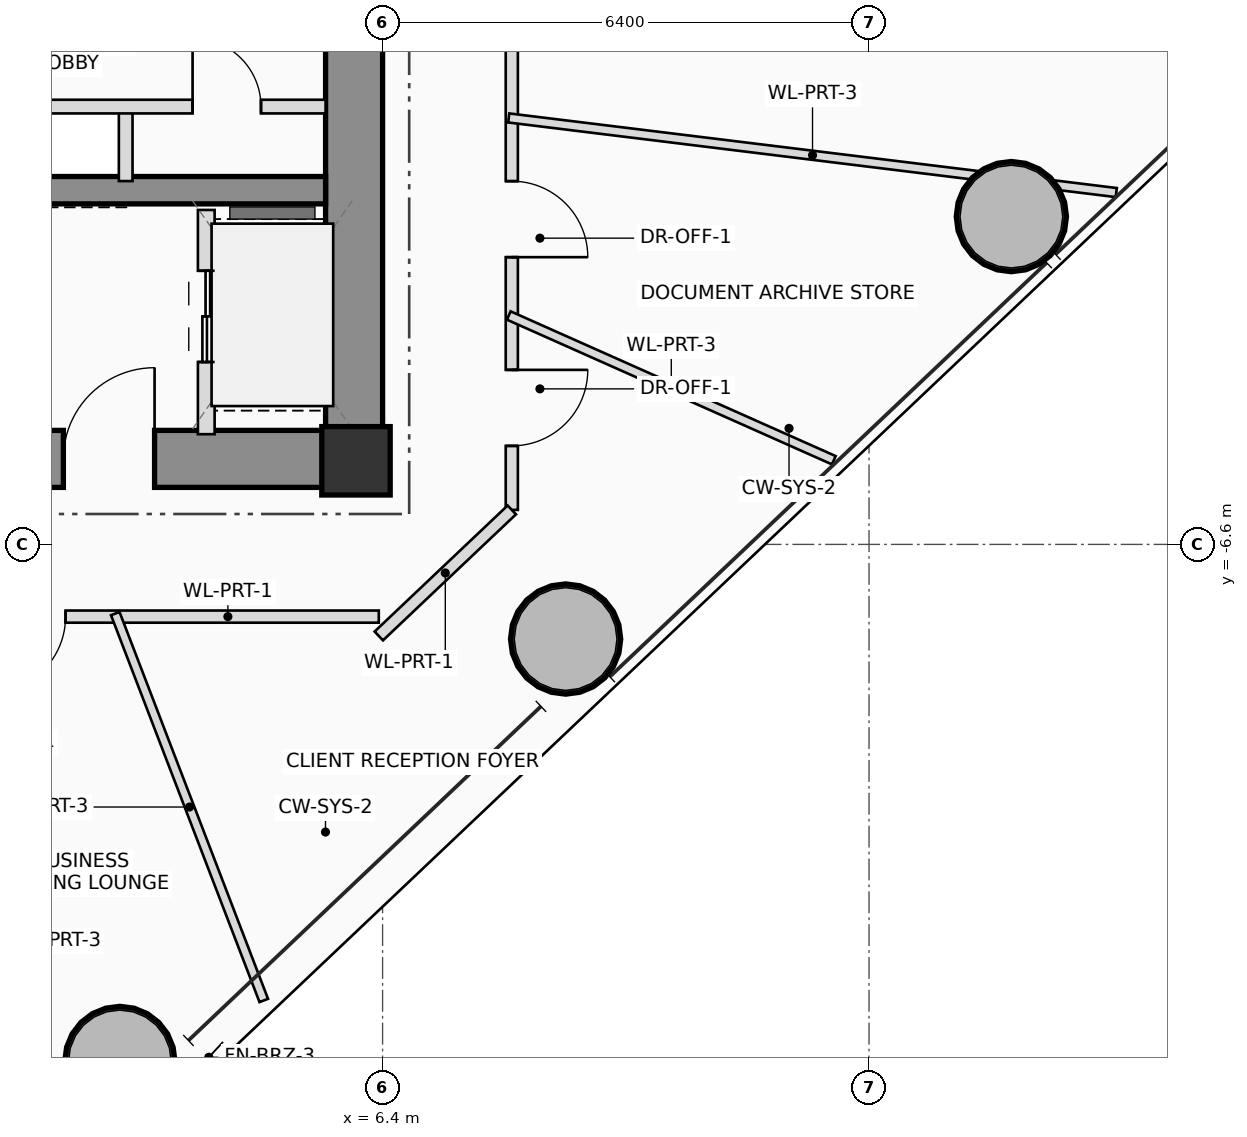
"""IFC4 building model, lengths in metres.
Left out: names, types, materials, properties, quantities, classifications, styles, units other than length and angle.
Written with IfcOpenShell. Run it as: python <this file> out.ifc"""

import sys

from ifc_helpers import new_model, si_unit, direction, frame, frame_2d, origin, origin_2d, place, context, subcontext, project, spatial, rectangle, hollow_circle, extrude, source, transform, mapped, element, fill, save


model = new_model("IFC4")
c1 = context("Model", 3, precision=1e-05, world=origin(), true_north=direction((0.0, 1.0)))
c2 = subcontext(c1, "Body", "Model", "MODEL_VIEW")
j1 = project(units=[si_unit("LENGTHUNIT", "METRE"), si_unit("PLANEANGLEUNIT", "RADIAN")], contexts=[c1])
p1 = place(None, origin())
s1 = spatial("IfcSite", under=j1, at=p1, CompositionType="ELEMENT")
p2 = place(p1, origin())
s2 = spatial("IfcBuilding", under=s1, at=p2, CompositionType="ELEMENT")
p3 = place(p2, frame((0.0, 0.0, 108.65)))
s3 = spatial("IfcBuildingStorey", under=s2, at=p3, CompositionType="ELEMENT", Elevation=108.65)
m1 = source(origin(), c2, "Body", "SweptSolid", [
    extrude(rectangle(XDim=0.9, YDim=0.9, at=origin_2d()), origin(), (0.0, 0.0, 1.0), 3.75),
])
p4 = place(p3, frame((6.05, -5.5, 0.0), z_axis=(0.0, 0.0, 1.0), x_axis=(1.0, 0.0, 0.0)))
e1 = element("IfcColumn", 1, at=p4, inside=s3, PredefinedType="COLUMN", context=c2, shape_type="MappedRepresentation", body=[
    mapped(m1, transform((0.0, 0.0, 0.0), scale=1.0)),
])
p5 = place(p3, frame((-6.4, -5.475, 0.0), z_axis=(0.0, 0.0, 1.0), x_axis=(1.0, 0.0, 0.0)))
e2 = element("IfcWall", 2, at=p5, inside=s3, PredefinedType="SHEAR", context=c2, shape_type="SweptSolid", body=[
    extrude(rectangle(XDim=12.8, YDim=0.75, at=frame_2d((6.4, 0.0))), origin(), (0.0, 0.0, 1.0), 3.75),
])
p6 = place(p5, frame((8.6, 0.0, 0.0)))
e3 = element("IfcOpeningElement", 3, at=p6, cuts=e2, PredefinedType="OPENING", context=c2, shape_type="SweptSolid", body=[
    extrude(rectangle(XDim=1.2, YDim=2.2, at=frame_2d((0.6, 1.1))), frame((0.0, 0.385, 0.0), z_axis=(0.0, -1.0, 0.0), x_axis=(1.0, 0.0, 0.0)), (0.0, 0.0, 1.0), 0.77),
])
p7 = place(p3, frame((6.025, -5.1, 0.0), z_axis=(0.0, 0.0, 1.0), x_axis=(0.0, 1.0, 0.0)))
e4 = element("IfcWall", 4, at=p7, inside=s3, PredefinedType="SHEAR", context=c2, shape_type="SweptSolid", body=[
    extrude(rectangle(XDim=10.2, YDim=0.75, at=frame_2d((5.1, 0.0))), origin(), (0.0, 0.0, 1.0), 3.75),
])
p8 = place(p3, frame((-5.65, -1.94, 0.0), z_axis=(0.0, 0.0, 1.0), x_axis=(1.0, 0.0, 0.0)))
e5 = element("IfcWall", 5, at=p8, inside=s3, PredefinedType="SHEAR", context=c2, shape_type="SweptSolid", body=[
    extrude(rectangle(XDim=11.3, YDim=0.36, at=frame_2d((5.65, 0.0))), origin(), (0.0, 0.0, 1.0), 3.75),
])
m2 = source(origin(), c2, "Body", "SweptSolid", [
    extrude(hollow_circle(Radius=0.725, WallThickness=0.05, at=origin_2d()), origin(), (0.0, 0.0, 1.0), 3.75),
])
for number, where, z_axis, x_axis in (
    (6, (2.943, -13.402, 0.0), (0.0, 0.0, 1.0), (1.0, 0.0, 0.0)),
    (7, (8.808, -7.845, 0.0), (0.0, 0.0, 1.0), (1.0, 0.0, 0.0)),
    (8, (14.673, -2.287, 0.0), (0.0, 0.0, 1.0), (1.0, 0.0, 0.0)),
):
    element("IfcColumn", number, at=place(p3, frame(where, z_axis=z_axis, x_axis=x_axis)), inside=s3, PredefinedType="COLUMN", context=c2, shape_type="MappedRepresentation", body=[
        mapped(m2, transform((0.0, 0.0, 0.0), scale=1.0)),
    ])
p9 = place(p3, frame((4.08, -5.15, 0.0), z_axis=(0.0, 0.0, 1.0), x_axis=(0.0, 1.0, 0.0)))
e9 = element("IfcWall", 9, at=p9, inside=s3, PredefinedType="PLUMBINGWALL", context=c2, shape_type="SweptSolid", body=[
    extrude(rectangle(XDim=2.95, YDim=0.22, at=frame_2d((1.475, 0.0))), origin(), (0.0, 0.0, 1.0), 3.545),
])
p10 = place(p9, frame((0.95, 0.0, 0.0)))
e10 = element("IfcOpeningElement", 10, at=p10, cuts=e9, PredefinedType="OPENING", context=c2, shape_type="SweptSolid", body=[
    extrude(rectangle(XDim=1.2, YDim=2.25, at=frame_2d((0.6, 1.125))), frame((0.0, 0.12, 0.0), z_axis=(0.0, -1.0, 0.0), x_axis=(1.0, 0.0, 0.0)), (0.0, 0.0, 1.0), 0.24),
])
p11 = place(p3, frame((3.02, -1.82, 0.0), z_axis=(0.0, 0.0, 1.0), x_axis=(0.0, 1.0, 0.0)))
e11 = element("IfcWall", 11, at=p11, inside=s3, PredefinedType="PLUMBINGWALL", context=c2, shape_type="SweptSolid", body=[
    extrude(rectangle(XDim=0.98, YDim=0.18, at=frame_2d((0.49, 0.0))), origin(), (0.0, 0.0, 1.0), 3.545),
])
p12 = place(p3, frame((-5.68, -0.84, 0.0), z_axis=(0.0, 0.0, 1.0), x_axis=(1.0, 0.0, 0.0)))
e12 = element("IfcWall", 12, at=p12, inside=s3, PredefinedType="PLUMBINGWALL", context=c2, shape_type="SweptSolid", body=[
    extrude(rectangle(XDim=11.33, YDim=0.18, at=frame_2d((5.665, 0.0))), origin(), (0.0, 0.0, 1.0), 3.545),
])
p13 = place(p12, frame((0.43, 0.0, 0.0)))
e13 = element("IfcOpeningElement", 13, at=p13, cuts=e12, PredefinedType="OPENING", context=c2, shape_type="SweptSolid", body=[
    extrude(rectangle(XDim=1.1, YDim=2.2, at=frame_2d((0.55, 1.1))), frame((0.0, 0.1, 0.0), z_axis=(0.0, -1.0, 0.0), x_axis=(1.0, 0.0, 0.0)), (0.0, 0.0, 1.0), 0.2),
])
p14 = place(p12, frame((2.13, 0.0, 0.0)))
e14 = element("IfcOpeningElement", 14, at=p14, cuts=e12, PredefinedType="OPENING", context=c2, shape_type="SweptSolid", body=[
    extrude(rectangle(XDim=1.1, YDim=2.2, at=frame_2d((0.55, 1.1))), frame((0.0, 0.1, 0.0), z_axis=(0.0, -1.0, 0.0), x_axis=(1.0, 0.0, 0.0)), (0.0, 0.0, 1.0), 0.2),
])
p15 = place(p12, frame((9.58, 0.0, 0.0)))
e15 = element("IfcOpeningElement", 15, at=p15, cuts=e12, PredefinedType="OPENING", context=c2, shape_type="SweptSolid", body=[
    extrude(rectangle(XDim=0.9, YDim=2.05, at=frame_2d((0.45, 1.025))), frame((0.0, 0.1, 0.0), z_axis=(0.0, -1.0, 0.0), x_axis=(1.0, 0.0, 0.0)), (0.0, 0.0, 1.0), 0.2),
])
p16 = place(p3, frame((8.1, -0.02, 0.0), z_axis=(0.0, 0.0, 1.0), x_axis=(0.0, -1.0, 0.0)))
e16 = element("IfcWall", 16, at=p16, inside=s3, PredefinedType="PARTITIONING", context=c2, shape_type="SweptSolid", body=[
    extrude(rectangle(XDim=6.126, YDim=0.16, at=frame_2d((3.063, 0.0))), origin(), (0.0, 0.0, 1.0), 2.85),
])
p17 = place(p16, frame((1.801, 0.0, 0.0)))
e17 = element("IfcOpeningElement", 17, at=p17, cuts=e16, PredefinedType="OPENING", context=c2, shape_type="SweptSolid", body=[
    extrude(rectangle(XDim=1.0, YDim=2.25, at=frame_2d((0.5, 1.125))), frame((0.0, 0.09, 0.0), z_axis=(0.0, -1.0, 0.0), x_axis=(1.0, 0.0, 0.0)), (0.0, 0.0, 1.0), 0.18),
])
p18 = place(p16, frame((4.284, 0.0, 0.0)))
e18 = element("IfcOpeningElement", 18, at=p18, cuts=e16, PredefinedType="OPENING", context=c2, shape_type="SweptSolid", body=[
    extrude(rectangle(XDim=1.0, YDim=2.25, at=frame_2d((0.5, 1.125))), frame((0.0, 0.09, 0.0), z_axis=(0.0, -1.0, 0.0), x_axis=(1.0, 0.0, 0.0)), (0.0, 0.0, 1.0), 0.18),
])
p19 = place(p3, frame((8.1, -6.146, 0.0), z_axis=(0.0, 0.0, 1.0), x_axis=(-0.725888815428, -0.687812058368, 0.0)))
e19 = element("IfcWall", 19, at=p19, inside=s3, PredefinedType="PARTITIONING", context=c2, shape_type="SweptSolid", body=[
    extrude(rectangle(XDim=2.411, YDim=0.16, at=frame_2d((1.206, 0.0))), origin(), (0.0, 0.0, 1.0), 2.85),
])
p20 = place(p3, frame((6.35, -7.55, 0.0), z_axis=(0.0, 0.0, 1.0), x_axis=(-1.0, 0.0, 0.0)))
e20 = element("IfcWall", 20, at=p20, inside=s3, PredefinedType="PARTITIONING", context=c2, shape_type="SweptSolid", body=[
    extrude(rectangle(XDim=12.7, YDim=0.16, at=frame_2d((6.35, 0.0))), origin(), (0.0, 0.0, 1.0), 2.85),
])
p21 = place(p20, frame((4.121, 0.0, 0.0)))
e21 = element("IfcOpeningElement", 21, at=p21, cuts=e20, PredefinedType="OPENING", context=c2, shape_type="SweptSolid", body=[
    extrude(rectangle(XDim=1.0, YDim=2.25, at=frame_2d((0.5, 1.125))), frame((0.0, 0.09, 0.0), z_axis=(0.0, -1.0, 0.0), x_axis=(1.0, 0.0, 0.0)), (0.0, 0.0, 1.0), 0.18),
])
p22 = place(p20, frame((7.966, 0.0, 0.0)))
e22 = element("IfcOpeningElement", 22, at=p22, cuts=e20, PredefinedType="OPENING", context=c2, shape_type="SweptSolid", body=[
    extrude(rectangle(XDim=1.0, YDim=2.25, at=frame_2d((0.5, 1.125))), frame((0.0, 0.09, 0.0), z_axis=(0.0, -1.0, 0.0), x_axis=(1.0, 0.0, 0.0)), (0.0, 0.0, 1.0), 0.18),
])
p23 = place(p3, frame((2.883, -7.51, 0.0), z_axis=(0.0, 0.0, 1.0), x_axis=(0.35836087515, -0.933583142072, 0.0)))
e23 = element("IfcWall", 23, at=p23, inside=s3, PredefinedType="PARTITIONING", context=c2, shape_type="SweptSolid", body=[
    extrude(rectangle(XDim=5.452, YDim=0.12, at=frame_2d((2.726, 0.0))), origin(), (0.0, 0.0, 1.0), 2.85),
])
p24 = place(p3, frame((8.06, -3.588, 0.0), z_axis=(0.0, 0.0, 1.0), x_axis=(0.913536081089, -0.406757702506, 0.0)))
e24 = element("IfcWall", 24, at=p24, inside=s3, PredefinedType="PARTITIONING", context=c2, shape_type="SweptSolid", body=[
    extrude(rectangle(XDim=4.682, YDim=0.12, at=frame_2d((2.341, 0.0))), origin(), (0.0, 0.0, 1.0), 2.85),
])
p25 = place(p3, frame((8.06, -0.99, 0.0), z_axis=(0.0, 0.0, 1.0), x_axis=(0.99254191086, -0.121903876831, 0.0)))
e25 = element("IfcWall", 25, at=p25, inside=s3, PredefinedType="PARTITIONING", context=c2, shape_type="SweptSolid", body=[
    extrude(rectangle(XDim=8.053, YDim=0.12, at=frame_2d((4.026, 0.0))), origin(), (0.0, 0.0, 1.0), 2.85),
])
p26 = place(p6, origin())
e26 = element("IfcDoor", 26, at=p26, inside=s3, OperationType="SINGLE_SWING_RIGHT", PredefinedType="DOOR", context=c2, shape_type="SweptSolid", body=[
    extrude(rectangle(XDim=1.2, YDim=2.2, at=frame_2d((0.6, 1.1))), frame((0.0, 0.025, 0.0), z_axis=(0.0, -1.0, 0.0), x_axis=(1.0, 0.0, 0.0)), (0.0, 0.0, 1.0), 0.05),
])
fill(e3, e26)
p27 = place(p10, origin())
e27 = element("IfcDoor", 27, at=p27, inside=s3, OperationType="DOUBLE_DOOR_SLIDING", PredefinedType="DOOR", context=c2, shape_type="SweptSolid", body=[
    extrude(rectangle(XDim=1.2, YDim=2.25, at=frame_2d((0.6, 1.125))), frame((0.0, 0.025, 0.0), z_axis=(0.0, -1.0, 0.0), x_axis=(1.0, 0.0, 0.0)), (0.0, 0.0, 1.0), 0.05),
])
fill(e10, e27)
p28 = place(p15, origin())
e28 = element("IfcDoor", 28, at=p28, inside=s3, OperationType="SINGLE_SWING_LEFT", PredefinedType="DOOR", context=c2, shape_type="SweptSolid", body=[
    extrude(rectangle(XDim=0.9, YDim=2.05, at=frame_2d((0.45, 1.025))), frame((0.0, 0.025, 0.0), z_axis=(0.0, -1.0, 0.0), x_axis=(1.0, 0.0, 0.0)), (0.0, 0.0, 1.0), 0.05),
])
fill(e15, e28)
p29 = place(p17, origin())
e29 = element("IfcDoor", 29, at=p29, inside=s3, OperationType="SINGLE_SWING_RIGHT", PredefinedType="DOOR", context=c2, shape_type="SweptSolid", body=[
    extrude(rectangle(XDim=1.0, YDim=2.25, at=frame_2d((0.5, 1.125))), frame((0.0, 0.025, 0.0), z_axis=(0.0, -1.0, 0.0), x_axis=(1.0, 0.0, 0.0)), (0.0, 0.0, 1.0), 0.05),
])
fill(e17, e29)
p30 = place(p18, origin())
e30 = element("IfcDoor", 30, at=p30, inside=s3, OperationType="SINGLE_SWING_LEFT", PredefinedType="DOOR", context=c2, shape_type="SweptSolid", body=[
    extrude(rectangle(XDim=1.0, YDim=2.25, at=frame_2d((0.5, 1.125))), frame((0.0, 0.025, 0.0), z_axis=(0.0, -1.0, 0.0), x_axis=(1.0, 0.0, 0.0)), (0.0, 0.0, 1.0), 0.05),
])
fill(e18, e30)
p31 = place(p21, origin())
e31 = element("IfcDoor", 31, at=p31, inside=s3, OperationType="SINGLE_SWING_RIGHT", PredefinedType="DOOR", context=c2, shape_type="SweptSolid", body=[
    extrude(rectangle(XDim=1.0, YDim=2.25, at=frame_2d((0.5, 1.125))), frame((0.0, 0.025, 0.0), z_axis=(0.0, -1.0, 0.0), x_axis=(1.0, 0.0, 0.0)), (0.0, 0.0, 1.0), 0.05),
])
fill(e21, e31)
save(model, sys.argv[1])
